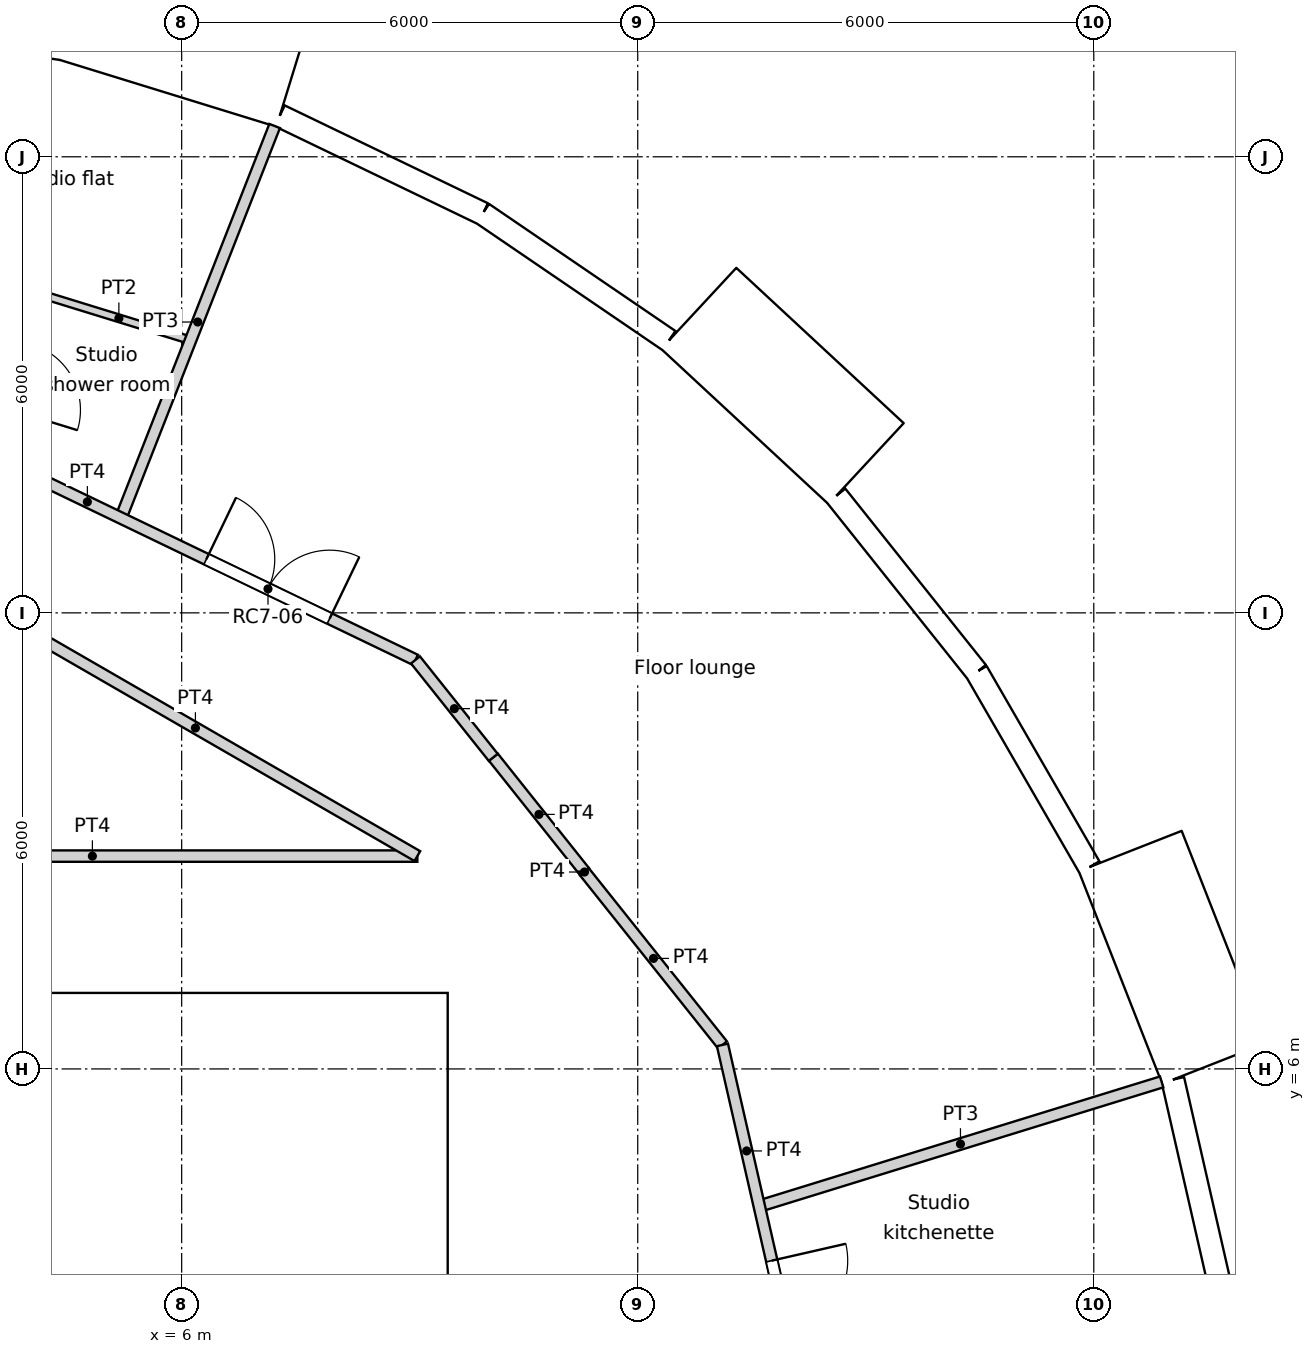
"""IFC4 building model, lengths in metres.
Left out: names, types, materials, properties, quantities, classifications, styles, units other than length and angle.
Written with IfcOpenShell. Run it as: python <this file> out.ifc"""

import sys

from ifc_helpers import new_model, si_unit, direction, frame, frame_2d, origin, origin_2d, place, context, subcontext, project, spatial, rectangle, circle, extrude, element, fill, save


model = new_model("IFC4")
c1 = context("Model", 3, precision=1e-05, world=origin(), true_north=direction((0.0, 1.0)))
c2 = subcontext(c1, "Body", "Model", "MODEL_VIEW")
j1 = project(units=[si_unit("LENGTHUNIT", "METRE"), si_unit("PLANEANGLEUNIT", "RADIAN")], contexts=[c1])
p1 = place(None, origin())
s1 = spatial("IfcSite", under=j1, at=p1, CompositionType="ELEMENT")
p2 = place(p1, origin())
s2 = spatial("IfcBuilding", under=s1, at=p2, CompositionType="ELEMENT")
p3 = place(p2, frame((0.0, 0.0, 294.6)))
s3 = spatial("IfcBuildingStorey", under=s2, at=p3, CompositionType="ELEMENT", Elevation=294.6)
for number, where, z_axis, x_axis in (
    (1, (17.986, 5.548, 0.0), (0.0, 0.0, 1.0), (1.0, 0.0, 0.0)),
    (2, (15.552, 10.603, 0.0), (0.0, 0.0, 1.0), (1.0, 0.0, 0.0)),
    (3, (11.735, 14.716, 0.0), (0.0, 0.0, 1.0), (1.0, 0.0, 0.0)),
    (4, (6.876, 17.521, 0.0), (0.0, 0.0, 1.0), (1.0, 0.0, 0.0)),
):
    element("IfcColumn", number, at=place(p3, frame(where, z_axis=z_axis, x_axis=x_axis)), inside=s3, PredefinedType="COLUMN", context=c2, shape_type="SweptSolid", body=[
        extrude(circle(Radius=0.45, at=origin_2d()), origin(), (0.0, 0.0, 1.0), 3.6),
    ])
p4 = place(p3, frame((19.699, 2.969, 0.0), z_axis=(0.0, 0.0, 1.0), x_axis=(-0.222529389789, 0.974925982155, 0.0)))
e5 = element("IfcWall", 5, at=p4, inside=s3, PredefinedType="SOLIDWALL", context=c2, shape_type="SweptSolid", body=[
    extrude(rectangle(XDim=2.962, YDim=0.3, at=frame_2d((1.481, 0.0))), origin(), (0.0, 0.0, 1.0), 3.25),
])
p5 = place(p4, frame((1.481, 0.0, 1.55)))
e6 = element("IfcOpeningElement", 6, at=p5, cuts=e5, PredefinedType="OPENING", context=c2, shape_type="SweptSolid", body=[
    extrude(circle(Radius=0.9, at=origin_2d()), frame((0.0, 0.16, 0.0), z_axis=(0.0, -1.0, 0.0), x_axis=(1.0, 0.0, 0.0)), (0.0, 0.0, 1.0), 0.32),
])
p6 = place(p3, frame((19.576, 6.072, -0.35), z_axis=(0.0, 0.0, 1.0), x_axis=(-0.36537792632, 0.93085926485, 0.0)))
e7 = element("IfcWall", 7, at=p6, inside=s3, PredefinedType="ELEMENTEDWALL", context=c2, shape_type="SweptSolid", body=[
    extrude(rectangle(XDim=3.0, YDim=1.45, at=frame_2d((1.5, 0.0))), origin(), (0.0, 0.0, 1.0), 3.6),
])
p7 = place(p6, frame((1.5, 0.0, 1.9)))
e8 = element("IfcOpeningElement", 8, at=p7, cuts=e7, PredefinedType="OPENING", context=c2, shape_type="SweptSolid", body=[
    extrude(circle(Radius=0.9, at=origin_2d()), frame((0.0, 0.735, 0.0), z_axis=(0.0, -1.0, 0.0), x_axis=(1.0, 0.0, 0.0)), (0.0, 0.0, 1.0), 1.47),
])
p8 = place(p3, frame((17.941, 8.657, 0.0), z_axis=(0.0, 0.0, 1.0), x_axis=(-0.499950756475, 0.86605383268, 0.0)))
e9 = element("IfcWall", 9, at=p8, inside=s3, PredefinedType="SOLIDWALL", context=c2, shape_type="SweptSolid", body=[
    extrude(rectangle(XDim=2.962, YDim=0.3, at=frame_2d((1.481, 0.0))), origin(), (0.0, 0.0, 1.0), 3.25),
])
p9 = place(p8, frame((1.481, 0.0, 1.55)))
e10 = element("IfcOpeningElement", 10, at=p9, cuts=e9, PredefinedType="OPENING", context=c2, shape_type="SweptSolid", body=[
    extrude(circle(Radius=0.9, at=origin_2d()), frame((0.0, 0.16, 0.0), z_axis=(0.0, -1.0, 0.0), x_axis=(1.0, 0.0, 0.0)), (0.0, 0.0, 1.0), 0.32),
])
p10 = place(p3, frame((16.46, 11.222, 0.0), z_axis=(0.0, 0.0, 1.0), x_axis=(-0.623498236992, 0.781824755599, 0.0)))
e11 = element("IfcWall", 11, at=p10, inside=s3, PredefinedType="SOLIDWALL", context=c2, shape_type="SweptSolid", body=[
    extrude(rectangle(XDim=2.962, YDim=0.3, at=frame_2d((1.481, 0.0))), origin(), (0.0, 0.0, 1.0), 3.25),
])
p11 = place(p10, frame((1.481, 0.0, 1.55)))
e12 = element("IfcOpeningElement", 12, at=p11, cuts=e11, PredefinedType="OPENING", context=c2, shape_type="SweptSolid", body=[
    extrude(circle(Radius=0.9, at=origin_2d()), frame((0.0, 0.16, 0.0), z_axis=(0.0, -1.0, 0.0), x_axis=(1.0, 0.0, 0.0)), (0.0, 0.0, 1.0), 0.32),
])
p12 = place(p3, frame((15.003, 13.964, -0.35), z_axis=(0.0, 0.0, 1.0), x_axis=(-0.733022439167, 0.680204457261, 0.0)))
e13 = element("IfcWall", 13, at=p12, inside=s3, PredefinedType="ELEMENTEDWALL", context=c2, shape_type="SweptSolid", body=[
    extrude(rectangle(XDim=3.0, YDim=1.45, at=frame_2d((1.5, 0.0))), origin(), (0.0, 0.0, 1.0), 3.6),
])
p13 = place(p12, frame((1.5, 0.0, 1.9)))
e14 = element("IfcOpeningElement", 14, at=p13, cuts=e13, PredefinedType="OPENING", context=c2, shape_type="SweptSolid", body=[
    extrude(circle(Radius=0.9, at=origin_2d()), frame((0.0, 0.735, 0.0), z_axis=(0.0, -1.0, 0.0), x_axis=(1.0, 0.0, 0.0)), (0.0, 0.0, 1.0), 1.47),
])
p14 = place(p3, frame((12.408, 15.584, 0.0), z_axis=(0.0, 0.0, 1.0), x_axis=(-0.826236061068, 0.563324037646, 0.0)))
e15 = element("IfcWall", 15, at=p14, inside=s3, PredefinedType="SOLIDWALL", context=c2, shape_type="SweptSolid", body=[
    extrude(rectangle(XDim=2.962, YDim=0.3, at=frame_2d((1.481, 0.0))), origin(), (0.0, 0.0, 1.0), 3.25),
])
p15 = place(p14, frame((1.481, 0.0, 1.55)))
e16 = element("IfcOpeningElement", 16, at=p15, cuts=e15, PredefinedType="OPENING", context=c2, shape_type="SweptSolid", body=[
    extrude(circle(Radius=0.9, at=origin_2d()), frame((0.0, 0.16, 0.0), z_axis=(0.0, -1.0, 0.0), x_axis=(1.0, 0.0, 0.0)), (0.0, 0.0, 1.0), 0.32),
])
p16 = place(p3, frame((9.961, 17.253, 0.0), z_axis=(0.0, 0.0, 1.0), x_axis=(-0.90095513435, 0.433912255978, 0.0)))
e17 = element("IfcWall", 17, at=p16, inside=s3, PredefinedType="SOLIDWALL", context=c2, shape_type="SweptSolid", body=[
    extrude(rectangle(XDim=2.962, YDim=0.3, at=frame_2d((1.481, 0.0))), origin(), (0.0, 0.0, 1.0), 3.25),
])
p17 = place(p16, frame((1.481, 0.0, 1.55)))
e18 = element("IfcOpeningElement", 18, at=p17, cuts=e17, PredefinedType="OPENING", context=c2, shape_type="SweptSolid", body=[
    extrude(circle(Radius=0.9, at=origin_2d()), frame((0.0, 0.16, 0.0), z_axis=(0.0, -1.0, 0.0), x_axis=(1.0, 0.0, 0.0)), (0.0, 0.0, 1.0), 0.32),
])
p18 = place(p3, frame((7.458, 19.091, -0.35), z_axis=(0.0, 0.0, 1.0), x_axis=(-0.955571139978, 0.294760574774, 0.0)))
e19 = element("IfcWall", 19, at=p18, inside=s3, PredefinedType="ELEMENTEDWALL", context=c2, shape_type="SweptSolid", body=[
    extrude(rectangle(XDim=3.0, YDim=1.45, at=frame_2d((1.5, 0.0))), origin(), (0.0, 0.0, 1.0), 3.6),
])
p19 = place(p18, frame((1.5, 0.0, 1.9)))
e20 = element("IfcOpeningElement", 20, at=p19, cuts=e19, PredefinedType="OPENING", context=c2, shape_type="SweptSolid", body=[
    extrude(circle(Radius=0.9, at=origin_2d()), frame((0.0, 0.735, 0.0), z_axis=(0.0, -1.0, 0.0), x_axis=(1.0, 0.0, 0.0)), (0.0, 0.0, 1.0), 1.47),
])
p20 = place(p3, frame((4.418, 19.425, 0.0), z_axis=(0.0, 0.0, 1.0), x_axis=(-0.988835775663, 0.149009425104, 0.0)))
e21 = element("IfcWall", 21, at=p20, inside=s3, PredefinedType="SOLIDWALL", context=c2, shape_type="SweptSolid", body=[
    extrude(rectangle(XDim=2.962, YDim=0.3, at=frame_2d((1.481, 0.0))), origin(), (0.0, 0.0, 1.0), 3.25),
])
p21 = place(p20, frame((1.481, 0.0, 1.55)))
e22 = element("IfcOpeningElement", 22, at=p21, cuts=e21, PredefinedType="OPENING", context=c2, shape_type="SweptSolid", body=[
    extrude(circle(Radius=0.9, at=origin_2d()), frame((0.0, 0.16, 0.0), z_axis=(0.0, -1.0, 0.0), x_axis=(1.0, 0.0, 0.0)), (0.0, 0.0, 1.0), 0.32),
])
p22 = place(p3, frame((-9.5, 6.7, 0.0), z_axis=(0.0, 0.0, 1.0), x_axis=(1.0, 0.0, 0.0)))
e23 = element("IfcWall", 23, at=p22, inside=s3, PredefinedType="SOLIDWALL", context=c2, shape_type="SweptSolid", body=[
    extrude(rectangle(XDim=19.0, YDim=0.6, at=frame_2d((9.5, 0.0))), origin(), (0.0, 0.0, 1.0), 3.6),
])
p23 = place(p22, frame((5.35, 0.0, 0.0)))
e24 = element("IfcOpeningElement", 24, at=p23, cuts=e23, PredefinedType="OPENING", context=c2, shape_type="SweptSolid", body=[
    extrude(rectangle(XDim=1.7, YDim=2.1, at=frame_2d((0.85, 1.05))), frame((0.0, 0.3, 0.0), z_axis=(0.0, -1.0, 0.0), x_axis=(1.0, 0.0, 0.0)), (0.0, 0.0, 1.0), 0.6),
])
p24 = place(p3, frame((9.2, -6.4, 0.0), z_axis=(0.0, 0.0, 1.0), x_axis=(0.0, 1.0, 0.0)))
e25 = element("IfcWall", 25, at=p24, inside=s3, PredefinedType="SOLIDWALL", context=c2, shape_type="SweptSolid", body=[
    extrude(rectangle(XDim=12.8, YDim=0.6, at=frame_2d((6.4, 0.0))), origin(), (0.0, 0.0, 1.0), 3.6),
])
p25 = place(p24, frame((6.4, 0.0, 0.0)))
e26 = element("IfcOpeningElement", 26, at=p25, cuts=e25, PredefinedType="OPENING", context=c2, shape_type="SweptSolid", body=[
    extrude(rectangle(XDim=1.8, YDim=2.1, at=frame_2d((0.9, 1.05))), frame((0.0, 0.3, 0.0), z_axis=(0.0, -1.0, 0.0), x_axis=(1.0, 0.0, 0.0)), (0.0, 0.0, 1.0), 0.6),
])
p26 = place(p3, frame((6.15, 3.25, 0.0), z_axis=(0.0, 0.0, 1.0), x_axis=(0.0, 1.0, 0.0)))
e27 = element("IfcWall", 27, at=p26, inside=s3, PredefinedType="SOLIDWALL", context=c2, shape_type="SweptSolid", body=[
    extrude(rectangle(XDim=3.15, YDim=0.3, at=frame_2d((1.575, 0.0))), origin(), (0.0, 0.0, 1.0), 3.25),
])
p27 = place(p3, frame((-9.092, 8.8, 0.0), z_axis=(0.0, 0.0, 1.0), x_axis=(1.0, 0.0, 0.0)))
e28 = element("IfcWall", 28, at=p27, inside=s3, PredefinedType="PARTITIONING", context=c2, shape_type="SweptSolid", body=[
    extrude(rectangle(XDim=18.193, YDim=0.15, at=frame_2d((9.096, 0.0))), origin(), (0.0, 0.0, 1.0), 3.25),
])
p28 = place(p27, frame((8.592, 0.0, 0.0)))
e29 = element("IfcOpeningElement", 29, at=p28, cuts=e28, PredefinedType="OPENING", context=c2, shape_type="SweptSolid", body=[
    extrude(rectangle(XDim=1.0, YDim=2.04, at=frame_2d((0.5, 1.02))), frame((0.0, 0.075, 0.0), z_axis=(0.0, -1.0, 0.0), x_axis=(1.0, 0.0, 0.0)), (0.0, 0.0, 1.0), 0.15),
])
p29 = place(p3, frame((10.101, 10.101, 0.0), z_axis=(0.0, 0.0, 1.0), x_axis=(0.623130947784, -0.782117524362, 0.0)))
e30 = element("IfcWall", 30, at=p29, inside=s3, PredefinedType="PARTITIONING", context=c2, shape_type="SweptSolid", body=[
    extrude(rectangle(XDim=1.924, YDim=0.15, at=frame_2d((0.962, 0.0))), origin(), (0.0, 0.0, 1.0), 3.25),
])
p30 = place(p3, frame((11.3, 8.585, 0.0), z_axis=(0.0, 0.0, 1.0), x_axis=(0.0, 1.0, 0.0)))
e31 = element("IfcWall", 31, at=p30, inside=s3, PredefinedType="PARTITIONING", context=c2, shape_type="SweptSolid", body=[
    extrude(rectangle(XDim=0.011, YDim=0.15, at=frame_2d((0.006, 0.0))), origin(), (0.0, 0.0, 1.0), 3.25),
])
p31 = place(p3, frame((13.115, 6.316, 0.0), z_axis=(0.0, 0.0, 1.0), x_axis=(0.222568978642, -0.97491694505, 0.0)))
e32 = element("IfcWall", 32, at=p31, inside=s3, PredefinedType="PARTITIONING", context=c2, shape_type="SweptSolid", body=[
    extrude(rectangle(XDim=6.479, YDim=0.15, at=frame_2d((3.239, 0.0))), origin(), (0.0, 0.0, 1.0), 3.25),
])
p32 = place(p31, frame((2.911, 0.0, 0.0)))
e33 = element("IfcOpeningElement", 33, at=p32, cuts=e32, PredefinedType="OPENING", context=c2, shape_type="SweptSolid", body=[
    extrude(rectangle(XDim=1.0, YDim=2.1, at=frame_2d((0.5, 1.05))), frame((0.0, 0.075, 0.0), z_axis=(0.0, -1.0, 0.0), x_axis=(1.0, 0.0, 0.0)), (0.0, 0.0, 1.0), 0.15),
])
p33 = place(p3, frame((11.3, 8.592, 0.0), z_axis=(0.0, 0.0, 1.0), x_axis=(0.623446514299, -0.781866001185, 0.0)))
e34 = element("IfcWall", 34, at=p33, inside=s3, PredefinedType="PARTITIONING", context=c2, shape_type="SweptSolid", body=[
    extrude(rectangle(XDim=2.911, YDim=0.15, at=frame_2d((1.456, 0.0))), origin(), (0.0, 0.0, 1.0), 3.25),
])
p34 = place(p3, frame((3.261, 12.171, 0.0), z_axis=(0.0, 0.0, 1.0), x_axis=(0.866066809554, -0.499928276245, 0.0)))
e35 = element("IfcWall", 35, at=p34, inside=s3, PredefinedType="PARTITIONING", context=c2, shape_type="SweptSolid", body=[
    extrude(rectangle(XDim=6.743, YDim=0.15, at=frame_2d((3.371, 0.0))), origin(), (0.0, 0.0, 1.0), 3.25),
])
p35 = place(p3, frame((3.239, 14.192, 0.0), z_axis=(0.0, 0.0, 1.0), x_axis=(0.900976027191, -0.433868872388, 0.0)))
e36 = element("IfcWall", 36, at=p35, inside=s3, PredefinedType="PARTITIONING", context=c2, shape_type="SweptSolid", body=[
    extrude(rectangle(XDim=6.479, YDim=0.15, at=frame_2d((3.239, 0.0))), origin(), (0.0, 0.0, 1.0), 3.25),
])
p36 = place(p35, frame((3.425, 0.0, 0.0)))
e37 = element("IfcOpeningElement", 37, at=p36, cuts=e36, PredefinedType="OPENING", context=c2, shape_type="SweptSolid", body=[
    extrude(rectangle(XDim=1.8, YDim=2.1, at=frame_2d((0.9, 1.05))), frame((0.0, 0.075, 0.0), z_axis=(0.0, -1.0, 0.0), x_axis=(1.0, 0.0, 0.0)), (0.0, 0.0, 1.0), 0.15),
])
p37 = place(p3, frame((9.076, 11.381, 0.0), z_axis=(0.0, 0.0, 1.0), x_axis=(0.623805208652, -0.781579849829, 0.0)))
e38 = element("IfcWall", 38, at=p37, inside=s3, PredefinedType="PARTITIONING", context=c2, shape_type="SweptSolid", body=[
    extrude(rectangle(XDim=1.64, YDim=0.15, at=frame_2d((0.82, 0.0))), origin(), (0.0, 0.0, 1.0), 3.25),
])
p38 = place(p3, frame((13.599, 4.195, 0.0), z_axis=(0.0, 0.0, 1.0), x_axis=(0.955510861731, 0.294955917239, 0.0)))
e39 = element("IfcWall", 39, at=p38, inside=s3, PredefinedType="PARTITIONING", context=c2, shape_type="SweptSolid", body=[
    extrude(rectangle(XDim=5.54, YDim=0.15, at=frame_2d((2.77, 0.0))), origin(), (0.0, 0.0, 1.0), 3.25),
])
p39 = place(p3, frame((5.2, 13.248, 0.0), z_axis=(0.0, 0.0, 1.0), x_axis=(0.365205108582, 0.930927080209, 0.0)))
e40 = element("IfcWall", 40, at=p39, inside=s3, PredefinedType="PARTITIONING", context=c2, shape_type="SweptSolid", body=[
    extrude(rectangle(XDim=5.54, YDim=0.15, at=frame_2d((2.77, 0.0))), origin(), (0.0, 0.0, 1.0), 3.25),
])
p40 = place(p3, frame((4.231, 16.166, 0.0), z_axis=(0.0, 0.0, 1.0), x_axis=(0.955671951668, -0.294433559219, 0.0)))
e41 = element("IfcWall", 41, at=p40, inside=s3, PredefinedType="PARTITIONING", context=c2, shape_type="SweptSolid", body=[
    extrude(rectangle(XDim=1.973, YDim=0.1, at=frame_2d((0.987, 0.0))), origin(), (0.0, 0.0, 1.0), 3.25),
])
p41 = place(p5, origin())
e42 = element("IfcWindow", 42, at=p41, inside=s3, PartitioningType="SINGLE_PANEL", PredefinedType="WINDOW", context=c2, shape_type="SweptSolid", body=[
    extrude(circle(Radius=0.9, at=origin_2d()), frame((0.0, 0.12, 0.0), z_axis=(0.0, -1.0, 0.0), x_axis=(1.0, 0.0, 0.0)), (0.0, 0.0, 1.0), 0.1),
])
fill(e6, e42)
p42 = place(p7, origin())
e43 = element("IfcWindow", 43, at=p42, inside=s3, PartitioningType="SINGLE_PANEL", PredefinedType="WINDOW", context=c2, shape_type="SweptSolid", body=[
    extrude(circle(Radius=0.9, at=origin_2d()), frame((0.0, 0.695, 0.0), z_axis=(0.0, -1.0, 0.0), x_axis=(1.0, 0.0, 0.0)), (0.0, 0.0, 1.0), 0.1),
])
fill(e8, e43)
p43 = place(p9, origin())
e44 = element("IfcWindow", 44, at=p43, inside=s3, PartitioningType="SINGLE_PANEL", PredefinedType="WINDOW", context=c2, shape_type="SweptSolid", body=[
    extrude(circle(Radius=0.9, at=origin_2d()), frame((0.0, 0.12, 0.0), z_axis=(0.0, -1.0, 0.0), x_axis=(1.0, 0.0, 0.0)), (0.0, 0.0, 1.0), 0.1),
])
fill(e10, e44)
p44 = place(p11, origin())
e45 = element("IfcWindow", 45, at=p44, inside=s3, PartitioningType="SINGLE_PANEL", PredefinedType="WINDOW", context=c2, shape_type="SweptSolid", body=[
    extrude(circle(Radius=0.9, at=origin_2d()), frame((0.0, 0.12, 0.0), z_axis=(0.0, -1.0, 0.0), x_axis=(1.0, 0.0, 0.0)), (0.0, 0.0, 1.0), 0.1),
])
fill(e12, e45)
p45 = place(p13, origin())
e46 = element("IfcWindow", 46, at=p45, inside=s3, PartitioningType="SINGLE_PANEL", PredefinedType="WINDOW", context=c2, shape_type="SweptSolid", body=[
    extrude(circle(Radius=0.9, at=origin_2d()), frame((0.0, 0.695, 0.0), z_axis=(0.0, -1.0, 0.0), x_axis=(1.0, 0.0, 0.0)), (0.0, 0.0, 1.0), 0.1),
])
fill(e14, e46)
p46 = place(p15, origin())
e47 = element("IfcWindow", 47, at=p46, inside=s3, PartitioningType="SINGLE_PANEL", PredefinedType="WINDOW", context=c2, shape_type="SweptSolid", body=[
    extrude(circle(Radius=0.9, at=origin_2d()), frame((0.0, 0.12, 0.0), z_axis=(0.0, -1.0, 0.0), x_axis=(1.0, 0.0, 0.0)), (0.0, 0.0, 1.0), 0.1),
])
fill(e16, e47)
p47 = place(p17, origin())
e48 = element("IfcWindow", 48, at=p47, inside=s3, PartitioningType="SINGLE_PANEL", PredefinedType="WINDOW", context=c2, shape_type="SweptSolid", body=[
    extrude(circle(Radius=0.9, at=origin_2d()), frame((0.0, 0.12, 0.0), z_axis=(0.0, -1.0, 0.0), x_axis=(1.0, 0.0, 0.0)), (0.0, 0.0, 1.0), 0.1),
])
fill(e18, e48)
p48 = place(p19, origin())
e49 = element("IfcWindow", 49, at=p48, inside=s3, PartitioningType="SINGLE_PANEL", PredefinedType="WINDOW", context=c2, shape_type="SweptSolid", body=[
    extrude(circle(Radius=0.9, at=origin_2d()), frame((0.0, 0.695, 0.0), z_axis=(0.0, -1.0, 0.0), x_axis=(1.0, 0.0, 0.0)), (0.0, 0.0, 1.0), 0.1),
])
fill(e20, e49)
p49 = place(p32, origin())
e50 = element("IfcDoor", 50, at=p49, inside=s3, OperationType="SINGLE_SWING_LEFT", PredefinedType="DOOR", context=c2, shape_type="SweptSolid", body=[
    extrude(rectangle(XDim=1.0, YDim=2.1, at=frame_2d((0.5, 1.05))), frame((0.0, 0.025, 0.0), z_axis=(0.0, -1.0, 0.0), x_axis=(1.0, 0.0, 0.0)), (0.0, 0.0, 1.0), 0.05),
])
fill(e33, e50)
p50 = place(p36, origin())
e51 = element("IfcDoor", 51, at=p50, inside=s3, OperationType="DOUBLE_DOOR_SINGLE_SWING", PredefinedType="DOOR", context=c2, shape_type="SweptSolid", body=[
    extrude(rectangle(XDim=1.8, YDim=2.1, at=frame_2d((0.9, 1.05))), frame((0.0, 0.025, 0.0), z_axis=(0.0, -1.0, 0.0), x_axis=(1.0, 0.0, 0.0)), (0.0, 0.0, 1.0), 0.05),
])
fill(e37, e51)
save(model, sys.argv[1])
